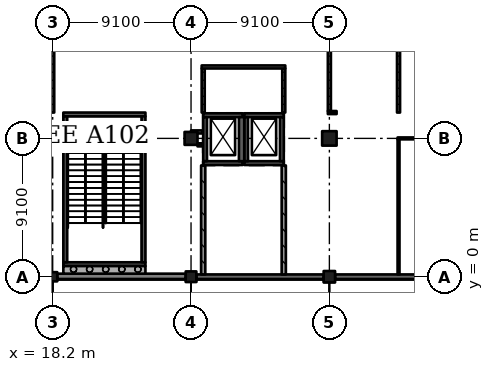
"""IFC4 building model, lengths in metres.
Left out: names, types, materials, properties, quantities, classifications, styles, units other than length and angle.
Written with IfcOpenShell. Run it as: python <this file> out.ifc"""

import sys

from ifc_helpers import new_model, si_unit, direction, frame, frame_2d, origin, origin_2d, place, context, subcontext, project, spatial, rectangle, extrude, element, fill, save


model = new_model("IFC4")
c1 = context("Model", 3, precision=1e-05, world=origin(), true_north=direction((0.0, 1.0)))
c2 = subcontext(c1, "Body", "Model", "MODEL_VIEW")
j1 = project(units=[si_unit("LENGTHUNIT", "METRE"), si_unit("PLANEANGLEUNIT", "RADIAN")], contexts=[c1])
p1 = place(None, origin())
s1 = spatial("IfcSite", under=j1, at=p1, CompositionType="ELEMENT")
p2 = place(p1, origin())
s2 = spatial("IfcBuilding", under=s1, at=p2, CompositionType="ELEMENT")
p3 = place(p2, origin())
s3 = spatial("IfcBuildingStorey", under=s2, at=p3, CompositionType="ELEMENT", Elevation=0.0)
p4 = place(p3, frame((18.2, 0.0, -0.4), z_axis=(0.0, 0.0, 1.0), x_axis=(1.0, 0.0, 0.0)))
e1 = element("IfcColumn", 1, at=p4, inside=s3, PredefinedType="COLUMN", context=c2, shape_type="SweptSolid", body=[
    extrude(rectangle(XDim=0.6, YDim=0.6, at=origin_2d()), origin(), (0.0, 0.0, 1.0), 6.77),
])
p5 = place(p3, frame((18.2, 9.1, -0.4), z_axis=(0.0, 0.0, 1.0), x_axis=(1.0, 0.0, 0.0)))
e2 = element("IfcColumn", 2, at=p5, inside=s3, PredefinedType="COLUMN", context=c2, shape_type="SweptSolid", body=[
    extrude(rectangle(XDim=0.8, YDim=0.8, at=origin_2d()), origin(), (0.0, 0.0, 1.0), 6.77),
])
p6 = place(p3, frame((27.3, 0.0, -0.4), z_axis=(0.0, 0.0, 1.0), x_axis=(1.0, 0.0, 0.0)))
e3 = element("IfcColumn", 3, at=p6, inside=s3, PredefinedType="COLUMN", context=c2, shape_type="SweptSolid", body=[
    extrude(rectangle(XDim=0.7, YDim=0.7, at=origin_2d()), origin(), (0.0, 0.0, 1.0), 6.77),
])
p7 = place(p3, frame((27.3, 9.1, -0.4), z_axis=(0.0, 0.0, 1.0), x_axis=(1.0, 0.0, 0.0)))
e4 = element("IfcColumn", 4, at=p7, inside=s3, PredefinedType="COLUMN", context=c2, shape_type="SweptSolid", body=[
    extrude(rectangle(XDim=0.85, YDim=0.85, at=origin_2d()), origin(), (0.0, 0.0, 1.0), 6.77),
])
p8 = place(p3, frame((36.4, 0.0, -0.4), z_axis=(0.0, 0.0, 1.0), x_axis=(1.0, 0.0, 0.0)))
e5 = element("IfcColumn", 5, at=p8, inside=s3, PredefinedType="COLUMN", context=c2, shape_type="SweptSolid", body=[
    extrude(rectangle(XDim=0.75, YDim=0.75, at=origin_2d()), origin(), (0.0, 0.0, 1.0), 6.77),
])
p9 = place(p3, frame((36.4, 9.1, -0.4), z_axis=(0.0, 0.0, 1.0), x_axis=(1.0, 0.0, 0.0)))
e6 = element("IfcColumn", 6, at=p9, inside=s3, PredefinedType="COLUMN", context=c2, shape_type="SweptSolid", body=[
    extrude(rectangle(XDim=0.95, YDim=0.95, at=origin_2d()), origin(), (0.0, 0.0, 1.0), 6.77),
])
p10 = place(p3, frame((30.7, 7.475, -1.4), z_axis=(0.0, 0.0, 1.0), x_axis=(-1.0, 0.0, 0.0)))
e7 = element("IfcWall", 7, at=p10, inside=s3, PredefinedType="SHEAR", context=c2, shape_type="SweptSolid", body=[
    extrude(rectangle(XDim=2.6, YDim=0.25, at=frame_2d((1.3, 0.0))), origin(), (0.0, 0.0, 1.0), 7.77),
])
p11 = place(p3, frame((30.7, 10.625, -1.4), z_axis=(0.0, 0.0, 1.0), x_axis=(-1.0, 0.0, 0.0)))
e8 = element("IfcWall", 8, at=p11, inside=s3, PredefinedType="SHEAR", context=c2, shape_type="SweptSolid", body=[
    extrude(rectangle(XDim=2.6, YDim=0.25, at=frame_2d((1.3, 0.0))), origin(), (0.0, 0.0, 1.0), 7.77),
])
p12 = place(p11, frame((0.8, 0.0, 1.4)))
e9 = element("IfcOpeningElement", 9, at=p12, cuts=e8, PredefinedType="OPENING", context=c2, shape_type="SweptSolid", body=[
    extrude(rectangle(XDim=1.0, YDim=2.1, at=frame_2d((0.5, 1.05))), frame((0.0, 0.135, 0.0), z_axis=(0.0, -1.0, 0.0), x_axis=(1.0, 0.0, 0.0)), (0.0, 0.0, 1.0), 0.27),
])
p13 = place(p3, frame((28.225, 10.5, -1.4), z_axis=(0.0, 0.0, 1.0), x_axis=(0.0, -1.0, 0.0)))
e10 = element("IfcWall", 10, at=p13, inside=s3, PredefinedType="SHEAR", context=c2, shape_type="SweptSolid", body=[
    extrude(rectangle(XDim=2.9, YDim=0.25, at=frame_2d((1.45, 0.0))), origin(), (0.0, 0.0, 1.0), 7.77),
])
p14 = place(p3, frame((30.625, 10.5, -1.4), z_axis=(0.0, 0.0, 1.0), x_axis=(0.0, -1.0, 0.0)))
e11 = element("IfcWall", 11, at=p14, inside=s3, PredefinedType="SHEAR", context=c2, shape_type="SweptSolid", body=[
    extrude(rectangle(XDim=2.9, YDim=0.35, at=frame_2d((1.45, 0.0))), origin(), (0.0, 0.0, 1.0), 7.77),
])
p15 = place(p3, frame((33.4, 7.475, -1.4), z_axis=(0.0, 0.0, 1.0), x_axis=(-1.0, 0.0, 0.0)))
e12 = element("IfcWall", 12, at=p15, inside=s3, PredefinedType="SHEAR", context=c2, shape_type="SweptSolid", body=[
    extrude(rectangle(XDim=2.6, YDim=0.25, at=frame_2d((1.3, 0.0))), origin(), (0.0, 0.0, 1.0), 7.77),
])
p16 = place(p3, frame((33.4, 10.625, -1.4), z_axis=(0.0, 0.0, 1.0), x_axis=(-1.0, 0.0, 0.0)))
e13 = element("IfcWall", 13, at=p16, inside=s3, PredefinedType="SHEAR", context=c2, shape_type="SweptSolid", body=[
    extrude(rectangle(XDim=2.6, YDim=0.25, at=frame_2d((1.3, 0.0))), origin(), (0.0, 0.0, 1.0), 7.77),
])
p17 = place(p16, frame((0.8, 0.0, 1.4)))
e14 = element("IfcOpeningElement", 14, at=p17, cuts=e13, PredefinedType="OPENING", context=c2, shape_type="SweptSolid", body=[
    extrude(rectangle(XDim=1.0, YDim=2.1, at=frame_2d((0.5, 1.05))), frame((0.0, 0.135, 0.0), z_axis=(0.0, -1.0, 0.0), x_axis=(1.0, 0.0, 0.0)), (0.0, 0.0, 1.0), 0.27),
])
for number, where, z_axis, x_axis in (
    (15, (30.925, 10.5, -1.4), (0.0, 0.0, 1.0), (0.0, -1.0, 0.0)),
    (16, (33.275, 10.5, -1.4), (0.0, 0.0, 1.0), (0.0, -1.0, 0.0)),
):
    element("IfcWall", number, at=place(p3, frame(where, z_axis=z_axis, x_axis=x_axis)), inside=s3, PredefinedType="SHEAR", context=c2, shape_type="SweptSolid", body=[
        extrude(rectangle(XDim=2.9, YDim=0.25, at=frame_2d((1.45, 0.0))), origin(), (0.0, 0.0, 1.0), 7.77),
    ])
p18 = place(p3, frame((24.3, 0.825, -0.4), z_axis=(0.0, 0.0, 1.0), x_axis=(-1.0, 0.0, 0.0)))
e17 = element("IfcWall", 17, at=p18, inside=s3, PredefinedType="SHEAR", context=c2, shape_type="SweptSolid", body=[
    extrude(rectangle(XDim=5.4, YDim=0.25, at=frame_2d((2.7, 0.0))), origin(), (0.0, 0.0, 1.0), 6.77),
])
p19 = place(p3, frame((24.3, 10.675, -0.4), z_axis=(0.0, 0.0, 1.0), x_axis=(-1.0, 0.0, 0.0)))
e18 = element("IfcWall", 18, at=p19, inside=s3, PredefinedType="SHEAR", context=c2, shape_type="SweptSolid", body=[
    extrude(rectangle(XDim=5.4, YDim=0.25, at=frame_2d((2.7, 0.0))), origin(), (0.0, 0.0, 1.0), 6.77),
])
p20 = place(p19, frame((1.5, 0.0, 0.4)))
e19 = element("IfcOpeningElement", 19, at=p20, cuts=e18, PredefinedType="OPENING", context=c2, shape_type="SweptSolid", body=[
    extrude(rectangle(XDim=2.4, YDim=2.1, at=frame_2d((1.2, 1.05))), frame((0.0, 0.135, 0.0), z_axis=(0.0, -1.0, 0.0), x_axis=(1.0, 0.0, 0.0)), (0.0, 0.0, 1.0), 0.27),
])
p21 = place(p3, frame((19.025, 10.55, -0.4), z_axis=(0.0, 0.0, 1.0), x_axis=(0.0, -1.0, 0.0)))
e20 = element("IfcWall", 20, at=p21, inside=s3, PredefinedType="SHEAR", context=c2, shape_type="SweptSolid", body=[
    extrude(rectangle(XDim=9.6, YDim=0.25, at=frame_2d((4.8, 0.0))), origin(), (0.0, 0.0, 1.0), 6.77),
])
p22 = place(p3, frame((24.175, 10.55, -0.4), z_axis=(0.0, 0.0, 1.0), x_axis=(0.0, -1.0, 0.0)))
e21 = element("IfcWall", 21, at=p22, inside=s3, PredefinedType="SHEAR", context=c2, shape_type="SweptSolid", body=[
    extrude(rectangle(XDim=9.6, YDim=0.25, at=frame_2d((4.8, 0.0))), origin(), (0.0, 0.0, 1.0), 6.77),
])
p23 = place(p22, frame((0.45, 0.0, 0.4)))
e22 = element("IfcOpeningElement", 22, at=p23, cuts=e21, PredefinedType="OPENING", context=c2, shape_type="SweptSolid", body=[
    extrude(rectangle(XDim=1.2, YDim=2.1, at=frame_2d((0.6, 1.05))), frame((0.0, 0.135, 0.0), z_axis=(0.0, -1.0, 0.0), x_axis=(1.0, 0.0, 0.0)), (0.0, 0.0, 1.0), 0.27),
])
p24 = place(p3, frame((18.5, 0.025, 0.0), z_axis=(0.0, 0.0, 1.0), x_axis=(1.0, 0.0, 0.0)))
e23 = element("IfcWall", 23, at=p24, inside=s3, PredefinedType="SOLIDWALL", context=c2, shape_type="SweptSolid", body=[
    extrude(rectangle(XDim=8.45, YDim=0.35, at=frame_2d((4.225, 0.0))), origin(), (0.0, 0.0, 1.0), 5.27),
])
p25 = place(p24, frame((5.95, 0.0, 0.0)))
e24 = element("IfcOpeningElement", 24, at=p25, cuts=e23, PredefinedType="OPENING", context=c2, shape_type="SweptSolid", body=[
    extrude(rectangle(XDim=2.1, YDim=2.4, at=frame_2d((1.05, 1.2))), frame((0.0, 0.185, 0.0), z_axis=(0.0, -1.0, 0.0), x_axis=(1.0, 0.0, 0.0)), (0.0, 0.0, 1.0), 0.37),
])
p26 = place(p3, frame((27.65, 0.0, 0.0), z_axis=(0.0, 0.0, 1.0), x_axis=(1.0, 0.0, 0.0)))
e25 = element("IfcWall", 25, at=p26, inside=s3, PredefinedType="SOLIDWALL", context=c2, shape_type="SweptSolid", body=[
    extrude(rectangle(XDim=8.375, YDim=0.3, at=frame_2d((4.188, 0.0))), origin(), (0.0, 0.0, 1.0), 5.32),
])
p27 = place(p26, frame((5.9, 0.0, 0.0)))
e26 = element("IfcOpeningElement", 26, at=p27, cuts=e25, PredefinedType="OPENING", context=c2, shape_type="SweptSolid", body=[
    extrude(rectangle(XDim=2.1, YDim=2.4, at=frame_2d((1.05, 1.2))), frame((0.0, 0.16, 0.0), z_axis=(0.0, -1.0, 0.0), x_axis=(1.0, 0.0, 0.0)), (0.0, 0.0, 1.0), 0.32),
])
p28 = place(p3, frame((36.775, 0.0, 0.0), z_axis=(0.0, 0.0, 1.0), x_axis=(1.0, 0.0, 0.0)))
e27 = element("IfcWall", 27, at=p28, inside=s3, PredefinedType="SOLIDWALL", context=c2, shape_type="SweptSolid", body=[
    extrude(rectangle(XDim=8.375, YDim=0.3, at=frame_2d((4.188, 0.0))), origin(), (0.0, 0.0, 1.0), 5.32),
])
p29 = place(p28, frame((0.7, 0.0, 0.0)))
e28 = element("IfcOpeningElement", 28, at=p29, cuts=e27, PredefinedType="OPENING", context=c2, shape_type="SweptSolid", body=[
    extrude(rectangle(XDim=3.0, YDim=2.4, at=frame_2d((1.5, 1.2))), frame((0.0, 0.16, 0.0), z_axis=(0.0, -1.0, 0.0), x_axis=(1.0, 0.0, 0.0)), (0.0, 0.0, 1.0), 0.32),
])
p30 = place(p3, frame((18.9, 0.45, 0.0), z_axis=(0.0, 0.0, 1.0), x_axis=(1.0, 0.0, 0.0)))
e29 = element("IfcWall", 29, at=p30, inside=s3, PredefinedType="SOLIDWALL", context=c2, shape_type="SweptSolid", body=[
    extrude(rectangle(XDim=5.4, YDim=0.5, at=frame_2d((2.7, 0.0))), origin(), (0.0, 0.0, 1.0), 6.37),
])
p31 = place(p3, frame((18.2, 17.725, 0.0), z_axis=(0.0, 0.0, 1.0), x_axis=(0.0, -1.0, 0.0)))
e30 = element("IfcWall", 30, at=p31, inside=s3, PredefinedType="PARTITIONING", context=c2, shape_type="SweptSolid", body=[
    extrude(rectangle(XDim=6.925, YDim=0.2, at=frame_2d((3.462, 0.0))), origin(), (0.0, 0.0, 1.0), 5.32),
])
p32 = place(p31, frame((0.85, 0.0, 0.0)))
e31 = element("IfcOpeningElement", 31, at=p32, cuts=e30, PredefinedType="OPENING", context=c2, shape_type="SweptSolid", body=[
    extrude(rectangle(XDim=1.8, YDim=2.4, at=frame_2d((0.9, 1.2))), frame((0.0, 0.11, 0.0), z_axis=(0.0, -1.0, 0.0), x_axis=(1.0, 0.0, 0.0)), (0.0, 0.0, 1.0), 0.22),
])
p33 = place(p31, frame((4.25, 0.0, 0.0)))
e32 = element("IfcOpeningElement", 32, at=p33, cuts=e30, PredefinedType="OPENING", context=c2, shape_type="SweptSolid", body=[
    extrude(rectangle(XDim=1.8, YDim=2.4, at=frame_2d((0.9, 1.2))), frame((0.0, 0.11, 0.0), z_axis=(0.0, -1.0, 0.0), x_axis=(1.0, 0.0, 0.0)), (0.0, 0.0, 1.0), 0.22),
])
p34 = place(p3, frame((27.3, 9.525, 0.0), z_axis=(0.0, 0.0, 1.0), x_axis=(1.0, 0.0, 0.0)))
e33 = element("IfcWall", 33, at=p34, inside=s3, PredefinedType="PARTITIONING", context=c2, shape_type="SweptSolid", body=[
    extrude(rectangle(XDim=0.77, YDim=0.2, at=frame_2d((0.385, 0.0))), origin(), (0.0, 0.0, 1.0), 6.02),
])
p35 = place(p3, frame((27.725, 8.675, 0.0), z_axis=(0.0, 0.0, 1.0), x_axis=(1.0, 0.0, 0.0)))
e34 = element("IfcWall", 34, at=p35, inside=s3, PredefinedType="PARTITIONING", context=c2, shape_type="SweptSolid", body=[
    extrude(rectangle(XDim=0.345, YDim=0.2, at=frame_2d((0.172, 0.0))), origin(), (0.0, 0.0, 1.0), 6.02),
])
p36 = place(p3, frame((28.1, 0.15, 0.0), z_axis=(0.0, 0.0, 1.0), x_axis=(0.0, 1.0, 0.0)))
e35 = element("IfcWall", 35, at=p36, inside=s3, PredefinedType="SOLIDWALL", context=c2, shape_type="SweptSolid", body=[
    extrude(rectangle(XDim=7.17, YDim=0.275, at=frame_2d((3.585, 0.0))), origin(), (0.0, 0.0, 1.0), 6.02),
])
p37 = place(p3, frame((28.1, 13.7, 0.0), z_axis=(0.0, 0.0, 1.0), x_axis=(0.0, -1.0, 0.0)))
e36 = element("IfcWall", 36, at=p37, inside=s3, PredefinedType="PARTITIONING", context=c2, shape_type="SweptSolid", body=[
    extrude(rectangle(XDim=2.9, YDim=0.2, at=frame_2d((1.45, 0.0))), origin(), (0.0, 0.0, 1.0), 6.02),
])
p38 = place(p37, frame((0.55, 0.0, 0.0)))
e37 = element("IfcOpeningElement", 37, at=p38, cuts=e36, PredefinedType="OPENING", context=c2, shape_type="SweptSolid", body=[
    extrude(rectangle(XDim=1.8, YDim=2.4, at=frame_2d((0.9, 1.2))), frame((0.0, 0.11, 0.0), z_axis=(0.0, -1.0, 0.0), x_axis=(1.0, 0.0, 0.0)), (0.0, 0.0, 1.0), 0.22),
])
p39 = place(p3, frame((33.4, 0.15, 0.0), z_axis=(0.0, 0.0, 1.0), x_axis=(0.0, 1.0, 0.0)))
e38 = element("IfcWall", 38, at=p39, inside=s3, PredefinedType="SOLIDWALL", context=c2, shape_type="SweptSolid", body=[
    extrude(rectangle(XDim=7.17, YDim=0.275, at=frame_2d((3.585, 0.0))), origin(), (0.0, 0.0, 1.0), 6.02),
])
p40 = place(p39, frame((2.95, 0.0, 0.0)))
e39 = element("IfcOpeningElement", 39, at=p40, cuts=e38, PredefinedType="OPENING", context=c2, shape_type="SweptSolid", body=[
    extrude(rectangle(XDim=1.2, YDim=2.4, at=frame_2d((0.6, 1.2))), frame((0.0, 0.147, 0.0), z_axis=(0.0, -1.0, 0.0), x_axis=(1.0, 0.0, 0.0)), (0.0, 0.0, 1.0), 0.295),
])
p41 = place(p3, frame((33.4, 10.8, 0.0), z_axis=(0.0, 0.0, 1.0), x_axis=(0.0, 1.0, 0.0)))
e40 = element("IfcWall", 40, at=p41, inside=s3, PredefinedType="PARTITIONING", context=c2, shape_type="SweptSolid", body=[
    extrude(rectangle(XDim=2.9, YDim=0.2, at=frame_2d((1.45, 0.0))), origin(), (0.0, 0.0, 1.0), 6.02),
])
p42 = place(p41, frame((0.55, 0.0, 0.0)))
e41 = element("IfcOpeningElement", 41, at=p42, cuts=e40, PredefinedType="OPENING", context=c2, shape_type="SweptSolid", body=[
    extrude(rectangle(XDim=1.8, YDim=2.4, at=frame_2d((0.9, 1.2))), frame((0.0, 0.11, 0.0), z_axis=(0.0, -1.0, 0.0), x_axis=(1.0, 0.0, 0.0)), (0.0, 0.0, 1.0), 0.22),
])
p43 = place(p3, frame((33.5, 13.8, 0.0), z_axis=(0.0, 0.0, 1.0), x_axis=(-1.0, 0.0, 0.0)))
e42 = element("IfcWall", 42, at=p43, inside=s3, PredefinedType="PARTITIONING", context=c2, shape_type="SweptSolid", body=[
    extrude(rectangle(XDim=5.5, YDim=0.2, at=frame_2d((2.75, 0.0))), origin(), (0.0, 0.0, 1.0), 6.02),
])
p44 = place(p43, frame((1.85, 0.0, 0.0)))
e43 = element("IfcOpeningElement", 43, at=p44, cuts=e42, PredefinedType="OPENING", context=c2, shape_type="SweptSolid", body=[
    extrude(rectangle(XDim=1.8, YDim=2.4, at=frame_2d((0.9, 1.2))), frame((0.0, 0.11, 0.0), z_axis=(0.0, -1.0, 0.0), x_axis=(1.0, 0.0, 0.0)), (0.0, 0.0, 1.0), 0.22),
])
p45 = place(p3, frame((36.3, 10.8, 0.0), z_axis=(0.0, 0.0, 1.0), x_axis=(1.0, 0.0, 0.0)))
e44 = element("IfcWall", 44, at=p45, inside=s3, PredefinedType="PARTITIONING", context=c2, shape_type="SweptSolid", body=[
    extrude(rectangle(XDim=0.575, YDim=0.2, at=frame_2d((0.288, 0.0))), origin(), (0.0, 0.0, 1.0), 6.02),
])
p46 = place(p3, frame((36.4, 17.725, 0.0), z_axis=(0.0, 0.0, 1.0), x_axis=(0.0, -1.0, 0.0)))
e45 = element("IfcWall", 45, at=p46, inside=s3, PredefinedType="PARTITIONING", context=c2, shape_type="SweptSolid", body=[
    extrude(rectangle(XDim=6.825, YDim=0.2, at=frame_2d((3.413, 0.0))), origin(), (0.0, 0.0, 1.0), 5.32),
])
p47 = place(p46, frame((0.85, 0.0, 0.0)))
e46 = element("IfcOpeningElement", 46, at=p47, cuts=e45, PredefinedType="OPENING", context=c2, shape_type="SweptSolid", body=[
    extrude(rectangle(XDim=1.8, YDim=2.4, at=frame_2d((0.9, 1.2))), frame((0.0, 0.11, 0.0), z_axis=(0.0, -1.0, 0.0), x_axis=(1.0, 0.0, 0.0)), (0.0, 0.0, 1.0), 0.22),
])
p48 = place(p46, frame((4.25, 0.0, 0.0)))
e47 = element("IfcOpeningElement", 47, at=p48, cuts=e45, PredefinedType="OPENING", context=c2, shape_type="SweptSolid", body=[
    extrude(rectangle(XDim=1.8, YDim=2.4, at=frame_2d((0.9, 1.2))), frame((0.0, 0.11, 0.0), z_axis=(0.0, -1.0, 0.0), x_axis=(1.0, 0.0, 0.0)), (0.0, 0.0, 1.0), 0.22),
])
p49 = place(p3, frame((40.95, 9.038, 0.0), z_axis=(0.0, 0.0, 1.0), x_axis=(0.0, -1.0, 0.0)))
e48 = element("IfcWall", 48, at=p49, inside=s3, PredefinedType="PARTITIONING", context=c2, shape_type="SweptSolid", body=[
    extrude(rectangle(XDim=8.888, YDim=0.125, at=frame_2d((4.444, 0.0))), origin(), (0.0, 0.0, 1.0), 6.02),
])
p50 = place(p3, frame((40.95, 18.1, 0.0), z_axis=(0.0, 0.0, 1.0), x_axis=(0.0, -1.0, 0.0)))
e49 = element("IfcWall", 49, at=p50, inside=s3, PredefinedType="PARTITIONING", context=c2, shape_type="SweptSolid", body=[
    extrude(rectangle(XDim=7.3, YDim=0.2, at=frame_2d((3.65, 0.0))), origin(), (0.0, 0.0, 1.0), 6.02),
])
p51 = place(p50, frame((0.95, 0.0, 0.0)))
e50 = element("IfcOpeningElement", 50, at=p51, cuts=e49, PredefinedType="OPENING", context=c2, shape_type="SweptSolid", body=[
    extrude(rectangle(XDim=1.8, YDim=2.4, at=frame_2d((0.9, 1.2))), frame((0.0, 0.11, 0.0), z_axis=(0.0, -1.0, 0.0), x_axis=(1.0, 0.0, 0.0)), (0.0, 0.0, 1.0), 0.22),
])
p52 = place(p50, frame((4.55, 0.0, 0.0)))
e51 = element("IfcOpeningElement", 51, at=p52, cuts=e49, PredefinedType="OPENING", context=c2, shape_type="SweptSolid", body=[
    extrude(rectangle(XDim=1.8, YDim=2.4, at=frame_2d((0.9, 1.2))), frame((0.0, 0.11, 0.0), z_axis=(0.0, -1.0, 0.0), x_axis=(1.0, 0.0, 0.0)), (0.0, 0.0, 1.0), 0.22),
])
p53 = place(p3, frame((44.95, 9.1, 0.0), z_axis=(0.0, 0.0, 1.0), x_axis=(-1.0, 0.0, 0.0)))
e52 = element("IfcWall", 52, at=p53, inside=s3, PredefinedType="PARTITIONING", context=c2, shape_type="SweptSolid", body=[
    extrude(rectangle(XDim=4.062, YDim=0.125, at=frame_2d((2.031, 0.0))), origin(), (0.0, 0.0, 1.0), 5.32),
])
p54 = place(p25, frame((2.1, 0.0, 0.0), z_axis=(0.0, 0.0, 1.0), x_axis=(-1.0, 0.0, 0.0)))
e53 = element("IfcDoor", 53, at=p54, inside=s3, OperationType="DOUBLE_DOOR_SINGLE_SWING", PredefinedType="DOOR", context=c2, shape_type="SweptSolid", body=[
    extrude(rectangle(XDim=2.1, YDim=2.4, at=frame_2d((1.05, 1.2))), frame((0.0, 0.025, 0.0), z_axis=(0.0, -1.0, 0.0), x_axis=(1.0, 0.0, 0.0)), (0.0, 0.0, 1.0), 0.05),
])
fill(e24, e53)
p55 = place(p27, frame((2.1, 0.0, 0.0), z_axis=(0.0, 0.0, 1.0), x_axis=(-1.0, 0.0, 0.0)))
e54 = element("IfcDoor", 54, at=p55, inside=s3, OperationType="DOUBLE_DOOR_SINGLE_SWING", PredefinedType="DOOR", context=c2, shape_type="SweptSolid", body=[
    extrude(rectangle(XDim=2.1, YDim=2.4, at=frame_2d((1.05, 1.2))), frame((0.0, 0.025, 0.0), z_axis=(0.0, -1.0, 0.0), x_axis=(1.0, 0.0, 0.0)), (0.0, 0.0, 1.0), 0.05),
])
fill(e26, e54)
p56 = place(p29, frame((3.0, 0.0, 0.0), z_axis=(0.0, 0.0, 1.0), x_axis=(-1.0, 0.0, 0.0)))
e55 = element("IfcDoor", 55, at=p56, inside=s3, OperationType="DOUBLE_DOOR_SINGLE_SWING", PredefinedType="DOOR", context=c2, shape_type="SweptSolid", body=[
    extrude(rectangle(XDim=3.0, YDim=2.4, at=frame_2d((1.5, 1.2))), frame((0.0, 0.025, 0.0), z_axis=(0.0, -1.0, 0.0), x_axis=(1.0, 0.0, 0.0)), (0.0, 0.0, 1.0), 0.05),
])
fill(e28, e55)
p57 = place(p40, origin())
e56 = element("IfcDoor", 56, at=p57, inside=s3, OperationType="SINGLE_SWING_RIGHT", PredefinedType="DOOR", context=c2, shape_type="SweptSolid", body=[
    extrude(rectangle(XDim=1.2, YDim=2.4, at=frame_2d((0.6, 1.2))), frame((0.0, 0.025, 0.0), z_axis=(0.0, -1.0, 0.0), x_axis=(1.0, 0.0, 0.0)), (0.0, 0.0, 1.0), 0.05),
])
fill(e39, e56)
p58 = place(p33, origin())
e57 = element("IfcDoor", 57, at=p58, inside=s3, OperationType="DOUBLE_DOOR_SINGLE_SWING", PredefinedType="DOOR", context=c2, shape_type="SweptSolid", body=[
    extrude(rectangle(XDim=1.8, YDim=2.4, at=frame_2d((0.9, 1.2))), frame((0.0, 0.025, 0.0), z_axis=(0.0, -1.0, 0.0), x_axis=(1.0, 0.0, 0.0)), (0.0, 0.0, 1.0), 0.05),
])
fill(e32, e57)
p59 = place(p48, origin())
e58 = element("IfcDoor", 58, at=p59, inside=s3, OperationType="DOUBLE_DOOR_SINGLE_SWING", PredefinedType="DOOR", context=c2, shape_type="SweptSolid", body=[
    extrude(rectangle(XDim=1.8, YDim=2.4, at=frame_2d((0.9, 1.2))), frame((0.0, 0.025, 0.0), z_axis=(0.0, -1.0, 0.0), x_axis=(1.0, 0.0, 0.0)), (0.0, 0.0, 1.0), 0.05),
])
fill(e47, e58)
p60 = place(p44, origin())
e59 = element("IfcDoor", 59, at=p60, inside=s3, OperationType="DOUBLE_DOOR_SINGLE_SWING", PredefinedType="DOOR", context=c2, shape_type="SweptSolid", body=[
    extrude(rectangle(XDim=1.8, YDim=2.4, at=frame_2d((0.9, 1.2))), frame((0.0, 0.025, 0.0), z_axis=(0.0, -1.0, 0.0), x_axis=(1.0, 0.0, 0.0)), (0.0, 0.0, 1.0), 0.05),
])
fill(e43, e59)
p61 = place(p38, origin())
e60 = element("IfcDoor", 60, at=p61, inside=s3, OperationType="DOUBLE_DOOR_SINGLE_SWING", PredefinedType="DOOR", context=c2, shape_type="SweptSolid", body=[
    extrude(rectangle(XDim=1.8, YDim=2.4, at=frame_2d((0.9, 1.2))), frame((0.0, 0.025, 0.0), z_axis=(0.0, -1.0, 0.0), x_axis=(1.0, 0.0, 0.0)), (0.0, 0.0, 1.0), 0.05),
])
fill(e37, e60)
p62 = place(p42, origin())
e61 = element("IfcDoor", 61, at=p62, inside=s3, OperationType="DOUBLE_DOOR_SINGLE_SWING", PredefinedType="DOOR", context=c2, shape_type="SweptSolid", body=[
    extrude(rectangle(XDim=1.8, YDim=2.4, at=frame_2d((0.9, 1.2))), frame((0.0, 0.025, 0.0), z_axis=(0.0, -1.0, 0.0), x_axis=(1.0, 0.0, 0.0)), (0.0, 0.0, 1.0), 0.05),
])
fill(e41, e61)
p63 = place(p52, origin())
e62 = element("IfcDoor", 62, at=p63, inside=s3, OperationType="DOUBLE_DOOR_SINGLE_SWING", PredefinedType="DOOR", context=c2, shape_type="SweptSolid", body=[
    extrude(rectangle(XDim=1.8, YDim=2.4, at=frame_2d((0.9, 1.2))), frame((0.0, 0.025, 0.0), z_axis=(0.0, -1.0, 0.0), x_axis=(1.0, 0.0, 0.0)), (0.0, 0.0, 1.0), 0.05),
])
fill(e51, e62)
p64 = place(p20, origin())
e63 = element("IfcDoor", 63, at=p64, inside=s3, OperationType="DOUBLE_DOOR_SINGLE_SWING", PredefinedType="DOOR", context=c2, shape_type="SweptSolid", body=[
    extrude(rectangle(XDim=2.4, YDim=2.1, at=frame_2d((1.2, 1.05))), frame((0.0, 0.025, 0.0), z_axis=(0.0, -1.0, 0.0), x_axis=(1.0, 0.0, 0.0)), (0.0, 0.0, 1.0), 0.05),
])
fill(e19, e63)
p65 = place(p23, origin())
e64 = element("IfcDoor", 64, at=p65, inside=s3, OperationType="SINGLE_SWING_RIGHT", PredefinedType="DOOR", context=c2, shape_type="SweptSolid", body=[
    extrude(rectangle(XDim=1.2, YDim=2.1, at=frame_2d((0.6, 1.05))), frame((0.0, 0.025, 0.0), z_axis=(0.0, -1.0, 0.0), x_axis=(1.0, 0.0, 0.0)), (0.0, 0.0, 1.0), 0.05),
])
fill(e22, e64)
p66 = place(p12, origin())
e65 = element("IfcDoor", 65, at=p66, inside=s3, OperationType="DOUBLE_DOOR_SLIDING", PredefinedType="DOOR", context=c2, shape_type="SweptSolid", body=[
    extrude(rectangle(XDim=1.0, YDim=2.1, at=frame_2d((0.5, 1.05))), frame((0.0, 0.025, 0.0), z_axis=(0.0, -1.0, 0.0), x_axis=(1.0, 0.0, 0.0)), (0.0, 0.0, 1.0), 0.05),
])
fill(e9, e65)
p67 = place(p17, origin())
e66 = element("IfcDoor", 66, at=p67, inside=s3, OperationType="DOUBLE_DOOR_SLIDING", PredefinedType="DOOR", context=c2, shape_type="SweptSolid", body=[
    extrude(rectangle(XDim=1.0, YDim=2.1, at=frame_2d((0.5, 1.05))), frame((0.0, 0.025, 0.0), z_axis=(0.0, -1.0, 0.0), x_axis=(1.0, 0.0, 0.0)), (0.0, 0.0, 1.0), 0.05),
])
fill(e14, e66)
save(model, sys.argv[1])
